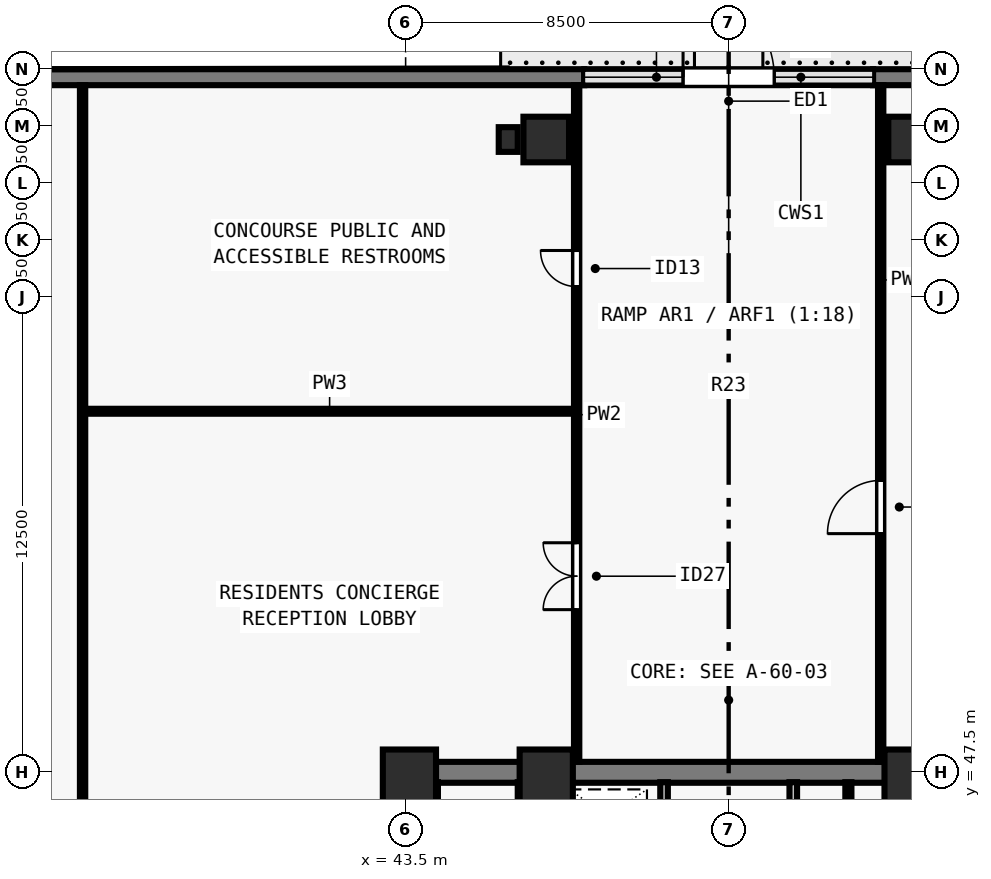
"""IFC4 building model, lengths in metres.
Left out: names, types, materials, properties, quantities, classifications, styles, units other than length and angle.
Written with IfcOpenShell. Run it as: python <this file> out.ifc"""

import sys

from ifc_helpers import new_model, si_unit, direction, frame, frame_2d, origin, origin_2d, place, context, subcontext, project, spatial, rectangle, extrude, element, fill, save


model = new_model("IFC4")
c1 = context("Model", 3, precision=1e-05, world=origin(), true_north=direction((0.0, 1.0)))
c2 = subcontext(c1, "Body", "Model", "MODEL_VIEW")
j1 = project(units=[si_unit("LENGTHUNIT", "METRE"), si_unit("PLANEANGLEUNIT", "RADIAN")], contexts=[c1])
p1 = place(None, origin())
s1 = spatial("IfcSite", under=j1, at=p1, CompositionType="ELEMENT")
p2 = place(p1, origin())
s2 = spatial("IfcBuilding", under=s1, at=p2, CompositionType="ELEMENT")
p3 = place(p2, origin())
s3 = spatial("IfcBuildingStorey", under=s2, at=p3, CompositionType="ELEMENT", Elevation=0.0)
for number, where, z_axis, x_axis in (
    (1, (43.6, 47.4, 0.0), (0.0, 0.0, 1.0), (1.0, 0.0, 0.0)),
    (2, (47.2, 47.4, 0.0), (0.0, 0.0, 1.0), (1.0, 0.0, 0.0)),
    (3, (56.8, 47.4, 0.0), (0.0, 0.0, 1.0), (1.0, 0.0, 0.0)),
):
    element("IfcColumn", number, at=place(p3, frame(where, z_axis=z_axis, x_axis=x_axis)), inside=s3, PredefinedType="COLUMN", context=c2, shape_type="SweptSolid", body=[
        extrude(rectangle(XDim=1.4, YDim=1.4, at=origin_2d()), origin(), (0.0, 0.0, 1.0), 5.0),
    ])
for number, where, z_axis, x_axis in (
    (4, (56.8, 64.15, 0.0), (0.0, 0.0, 1.0), (1.0, 0.0, 0.0)),
    (5, (47.2, 64.15, 0.0), (0.0, 0.0, 1.0), (1.0, 0.0, 0.0)),
):
    element("IfcColumn", number, at=place(p3, frame(where, z_axis=z_axis, x_axis=x_axis)), inside=s3, PredefinedType="COLUMN", context=c2, shape_type="SweptSolid", body=[
        extrude(rectangle(XDim=1.2, YDim=1.2, at=origin_2d()), origin(), (0.0, 0.0, 1.0), 5.0),
    ])
p4 = place(p3, frame((46.2, 64.15, 0.0), z_axis=(0.0, 0.0, 1.0), x_axis=(1.0, 0.0, 0.0)))
e6 = element("IfcColumn", 6, at=p4, inside=s3, PredefinedType="PILASTER", context=c2, shape_type="SweptSolid", body=[
    extrude(rectangle(XDim=0.5, YDim=0.65, at=origin_2d()), origin(), (0.0, 0.0, 1.0), 5.0),
])
p5 = place(p3, frame((18.0, 65.79, 0.0), z_axis=(0.0, 0.0, 1.0), x_axis=(1.0, 0.0, 0.0)))
e7 = element("IfcWall", 7, at=p5, inside=s3, PredefinedType="SOLIDWALL", context=c2, shape_type="SweptSolid", body=[
    extrude(rectangle(XDim=30.2, YDim=0.42, at=frame_2d((15.1, 0.0))), origin(), (0.0, 0.0, 1.0), 4.7),
])
p6 = place(p5, frame((14.5, 0.0, 0.0)))
e8 = element("IfcOpeningElement", 8, at=p6, cuts=e7, PredefinedType="OPENING", context=c2, shape_type="SweptSolid", body=[
    extrude(rectangle(XDim=1.25, YDim=2.15, at=frame_2d((0.625, 1.075))), frame((0.0, 0.22, 0.0), z_axis=(0.0, -1.0, 0.0), x_axis=(1.0, 0.0, 0.0)), (0.0, 0.0, 1.0), 0.44),
])
p7 = place(p3, frame((48.2, 65.79, 0.0), z_axis=(0.0, 0.0, 1.0), x_axis=(1.0, 0.0, 0.0)))
e9 = element("IfcWall", 9, at=p7, inside=s3, PredefinedType="SOLIDWALL", context=c2, shape_type="SweptSolid", body=[
    extrude(rectangle(XDim=7.6, YDim=0.42, at=frame_2d((3.8, 0.0))), origin(), (0.0, 0.0, 1.0), 2.85),
])
p8 = place(p7, frame((2.6, 0.0, 0.0)))
e10 = element("IfcOpeningElement", 10, at=p8, cuts=e9, PredefinedType="OPENING", context=c2, shape_type="SweptSolid", body=[
    extrude(rectangle(XDim=2.4, YDim=2.7, at=frame_2d((1.2, 1.35))), frame((0.0, 0.22, 0.0), z_axis=(0.0, -1.0, 0.0), x_axis=(1.0, 0.0, 0.0)), (0.0, 0.0, 1.0), 0.44),
])
p9 = place(p3, frame((55.8, 65.79, 0.0), z_axis=(0.0, 0.0, 1.0), x_axis=(1.0, 0.0, 0.0)))
e11 = element("IfcWall", 11, at=p9, inside=s3, PredefinedType="SOLIDWALL", context=c2, shape_type="SweptSolid", body=[
    extrude(rectangle(XDim=21.795, YDim=0.42, at=frame_2d((10.897, 0.0))), origin(), (0.0, 0.0, 1.0), 4.7),
])
p10 = place(p9, frame((9.5, 0.0, 0.0)))
e12 = element("IfcOpeningElement", 12, at=p10, cuts=e11, PredefinedType="OPENING", context=c2, shape_type="SweptSolid", body=[
    extrude(rectangle(XDim=1.8, YDim=2.35, at=frame_2d((0.9, 1.175))), frame((0.0, 0.22, 0.0), z_axis=(0.0, -1.0, 0.0), x_axis=(1.0, 0.0, 0.0)), (0.0, 0.0, 1.0), 0.44),
])
p11 = place(p3, frame((43.225, 47.5, 0.0), z_axis=(0.0, 0.0, 1.0), x_axis=(1.0, 0.0, 0.0)))
e13 = element("IfcWall", 13, at=p11, inside=s3, PredefinedType="SHEAR", context=c2, shape_type="SweptSolid", body=[
    extrude(rectangle(XDim=17.55, YDim=0.55, at=frame_2d((8.775, 0.0))), origin(), (0.0, 0.0, 1.0), 4.7),
])
p12 = place(p3, frame((43.5, 40.8, 0.0), z_axis=(0.0, 0.0, 1.0), x_axis=(0.0, 1.0, 0.0)))
e14 = element("IfcWall", 14, at=p12, inside=s3, PredefinedType="SHEAR", context=c2, shape_type="SweptSolid", body=[
    extrude(rectangle(XDim=6.435, YDim=0.55, at=frame_2d((3.218, 0.0))), origin(), (0.0, 0.0, 1.0), 4.7),
])
p13 = place(p3, frame((50.3, 40.585, 0.0), z_axis=(0.0, 0.0, 1.0), x_axis=(0.0, 1.0, 0.0)))
e15 = element("IfcWall", 15, at=p13, inside=s3, PredefinedType="SOLIDWALL", context=c2, shape_type="SweptSolid", body=[
    extrude(rectangle(XDim=6.655, YDim=0.2, at=frame_2d((3.328, 0.0))), origin(), (0.0, 0.0, 1.0), 4.7),
])
p14 = place(p13, frame((0.515, 0.0, 0.0)))
e16 = element("IfcOpeningElement", 16, at=p14, cuts=e15, PredefinedType="OPENING", context=c2, shape_type="SweptSolid", body=[
    extrude(rectangle(XDim=1.1, YDim=2.2, at=frame_2d((0.55, 1.1))), frame((0.0, 0.11, 0.0), z_axis=(0.0, -1.0, 0.0), x_axis=(1.0, 0.0, 0.0)), (0.0, 0.0, 1.0), 0.22),
])
p15 = place(p13, frame((3.015, 0.0, 0.0)))
e17 = element("IfcOpeningElement", 17, at=p15, cuts=e15, PredefinedType="OPENING", context=c2, shape_type="SweptSolid", body=[
    extrude(rectangle(XDim=1.1, YDim=2.2, at=frame_2d((0.55, 1.1))), frame((0.0, 0.11, 0.0), z_axis=(0.0, -1.0, 0.0), x_axis=(1.0, 0.0, 0.0)), (0.0, 0.0, 1.0), 0.22),
])
p16 = place(p13, frame((5.065, 0.0, 0.0)))
e18 = element("IfcOpeningElement", 18, at=p16, cuts=e15, PredefinedType="OPENING", context=c2, shape_type="SweptSolid", body=[
    extrude(rectangle(XDim=0.8, YDim=2.08, at=frame_2d((0.4, 1.04))), frame((0.0, 0.11, 0.0), z_axis=(0.0, -1.0, 0.0), x_axis=(1.0, 0.0, 0.0)), (0.0, 0.0, 1.0), 0.22),
])
p17 = place(p3, frame((53.7, 40.585, 0.0), z_axis=(0.0, 0.0, 1.0), x_axis=(0.0, 1.0, 0.0)))
e19 = element("IfcWall", 19, at=p17, inside=s3, PredefinedType="SOLIDWALL", context=c2, shape_type="SweptSolid", body=[
    extrude(rectangle(XDim=6.655, YDim=0.2, at=frame_2d((3.328, 0.0))), origin(), (0.0, 0.0, 1.0), 4.7),
])
p18 = place(p17, frame((0.195, 0.0, 0.0)))
e20 = element("IfcOpeningElement", 20, at=p18, cuts=e19, PredefinedType="OPENING", context=c2, shape_type="SweptSolid", body=[
    extrude(rectangle(XDim=0.8, YDim=2.08, at=frame_2d((0.4, 1.04))), frame((0.0, 0.11, 0.0), z_axis=(0.0, -1.0, 0.0), x_axis=(1.0, 0.0, 0.0)), (0.0, 0.0, 1.0), 0.22),
])
p19 = place(p17, frame((1.865, 0.0, 0.0)))
e21 = element("IfcOpeningElement", 21, at=p19, cuts=e19, PredefinedType="OPENING", context=c2, shape_type="SweptSolid", body=[
    extrude(rectangle(XDim=1.1, YDim=2.2, at=frame_2d((0.55, 1.1))), frame((0.0, 0.11, 0.0), z_axis=(0.0, -1.0, 0.0), x_axis=(1.0, 0.0, 0.0)), (0.0, 0.0, 1.0), 0.22),
])
p20 = place(p17, frame((4.265, 0.0, 0.0)))
e22 = element("IfcOpeningElement", 22, at=p20, cuts=e19, PredefinedType="OPENING", context=c2, shape_type="SweptSolid", body=[
    extrude(rectangle(XDim=0.95, YDim=2.12, at=frame_2d((0.475, 1.06))), frame((0.0, 0.11, 0.0), z_axis=(0.0, -1.0, 0.0), x_axis=(1.0, 0.0, 0.0)), (0.0, 0.0, 1.0), 0.22),
])
for number, where, z_axis, x_axis in (
    (23, (46.55, 43.735, 0.0), (0.0, 0.0, 1.0), (0.0, 1.0, 0.0)),
    (24, (44.25, 43.735, 0.0), (0.0, 0.0, 1.0), (0.0, 1.0, 0.0)),
):
    element("IfcWall", number, at=place(p3, frame(where, z_axis=z_axis, x_axis=x_axis)), inside=s3, PredefinedType="SOLIDWALL", context=c2, shape_type="SweptSolid", body=[
        extrude(rectangle(XDim=3.505, YDim=0.2, at=frame_2d((1.752, 0.0))), origin(), (0.0, 0.0, 1.0), 4.7),
    ])
for number, where, z_axis, x_axis in (
    (25, (47.35, 43.735, 0.0), (0.0, 0.0, 1.0), (0.0, 1.0, 0.0)),
    (26, (56.65, 43.735, 0.0), (0.0, 0.0, 1.0), (0.0, 1.0, 0.0)),
):
    element("IfcWall", number, at=place(p3, frame(where, z_axis=z_axis, x_axis=x_axis)), inside=s3, PredefinedType="SOLIDWALL", context=c2, shape_type="SweptSolid", body=[
        extrude(rectangle(XDim=3.505, YDim=0.18, at=frame_2d((1.752, 0.0))), origin(), (0.0, 0.0, 1.0), 4.7),
    ])
p21 = place(p3, frame((55.15, 44.195, 0.0), z_axis=(0.0, 0.0, 1.0), x_axis=(0.0, 1.0, 0.0)))
e27 = element("IfcWall", 27, at=p21, inside=s3, PredefinedType="PARTITIONING", context=c2, shape_type="SweptSolid", body=[
    extrude(rectangle(XDim=3.045, YDim=0.16, at=frame_2d((1.522, 0.0))), origin(), (0.0, 0.0, 1.0), 4.7),
])
p22 = place(p21, frame((1.025, 0.0, 0.0)))
e28 = element("IfcOpeningElement", 28, at=p22, cuts=e27, PredefinedType="OPENING", context=c2, shape_type="SweptSolid", body=[
    extrude(rectangle(XDim=0.8, YDim=2.1, at=frame_2d((0.4, 1.05))), frame((0.0, 0.09, 0.0), z_axis=(0.0, -1.0, 0.0), x_axis=(1.0, 0.0, 0.0)), (0.0, 0.0, 1.0), 0.18),
])
p23 = place(p3, frame((48.0, 47.78, 0.0), z_axis=(0.0, 0.0, 1.0), x_axis=(0.0, 1.0, 0.0)))
e29 = element("IfcWall", 29, at=p23, inside=s3, PredefinedType="PARTITIONING", context=c2, shape_type="SweptSolid", body=[
    extrude(rectangle(XDim=17.8, YDim=0.14, at=frame_2d((8.9, 0.0))), origin(), (0.0, 0.0, 1.0), 4.7),
])
p24 = place(p23, frame((4.0, 0.0, 0.0)))
e30 = element("IfcOpeningElement", 30, at=p24, cuts=e29, PredefinedType="OPENING", context=c2, shape_type="SweptSolid", body=[
    extrude(rectangle(XDim=1.76, YDim=2.2, at=frame_2d((0.88, 1.1))), frame((0.0, 0.08, 0.0), z_axis=(0.0, -1.0, 0.0), x_axis=(1.0, 0.0, 0.0)), (0.0, 0.0, 1.0), 0.16),
])
p25 = place(p23, frame((12.5, 0.0, 0.0)))
e31 = element("IfcOpeningElement", 31, at=p25, cuts=e29, PredefinedType="OPENING", context=c2, shape_type="SweptSolid", body=[
    extrude(rectangle(XDim=0.95, YDim=2.1, at=frame_2d((0.475, 1.05))), frame((0.0, 0.08, 0.0), z_axis=(0.0, -1.0, 0.0), x_axis=(1.0, 0.0, 0.0)), (0.0, 0.0, 1.0), 0.16),
])
p26 = place(p3, frame((56.0, 47.78, 0.0), z_axis=(0.0, 0.0, 1.0), x_axis=(0.0, 1.0, 0.0)))
e32 = element("IfcWall", 32, at=p26, inside=s3, PredefinedType="PARTITIONING", context=c2, shape_type="SweptSolid", body=[
    extrude(rectangle(XDim=17.8, YDim=0.14, at=frame_2d((8.9, 0.0))), origin(), (0.0, 0.0, 1.0), 4.7),
])
p27 = place(p26, frame((6.0, 0.0, 0.0)))
e33 = element("IfcOpeningElement", 33, at=p27, cuts=e32, PredefinedType="OPENING", context=c2, shape_type="SweptSolid", body=[
    extrude(rectangle(XDim=1.4, YDim=2.2, at=frame_2d((0.7, 1.1))), frame((0.0, 0.08, 0.0), z_axis=(0.0, -1.0, 0.0), x_axis=(1.0, 0.0, 0.0)), (0.0, 0.0, 1.0), 0.16),
])
p28 = place(p3, frame((35.0, 41.455, 0.0), z_axis=(0.0, 0.0, 1.0), x_axis=(0.0, 1.0, 0.0)))
e34 = element("IfcWall", 34, at=p28, inside=s3, PredefinedType="PARTITIONING", context=c2, shape_type="SweptSolid", body=[
    extrude(rectangle(XDim=24.125, YDim=0.14, at=frame_2d((12.062, 0.0))), origin(), (0.0, 0.0, 1.0), 3.751),
])
p29 = place(p3, frame((35.055, 57.0, 0.0), z_axis=(0.0, 0.0, 1.0), x_axis=(1.0, 0.0, 0.0)))
e35 = element("IfcWall", 35, at=p29, inside=s3, PredefinedType="PLUMBINGWALL", context=c2, shape_type="SweptSolid", body=[
    extrude(rectangle(XDim=12.89, YDim=0.13, at=frame_2d((6.445, 0.0))), origin(), (0.0, 0.0, 1.0), 4.7),
])
p30 = place(p8, origin())
e36 = element("IfcDoor", 36, at=p30, inside=s3, OperationType="SINGLE_SWING_LEFT", PredefinedType="DOOR", context=c2, shape_type="SweptSolid", body=[
    extrude(rectangle(XDim=2.4, YDim=2.7, at=frame_2d((1.2, 1.35))), frame((0.0, 0.025, 0.0), z_axis=(0.0, -1.0, 0.0), x_axis=(1.0, 0.0, 0.0)), (0.0, 0.0, 1.0), 0.05),
])
fill(e10, e36)
p31 = place(p24, origin())
e37 = element("IfcDoor", 37, at=p31, inside=s3, OperationType="DOUBLE_DOOR_SINGLE_SWING", PredefinedType="DOOR", context=c2, shape_type="SweptSolid", body=[
    extrude(rectangle(XDim=1.76, YDim=2.2, at=frame_2d((0.88, 1.1))), frame((0.0, 0.025, 0.0), z_axis=(0.0, -1.0, 0.0), x_axis=(1.0, 0.0, 0.0)), (0.0, 0.0, 1.0), 0.05),
])
fill(e30, e37)
p32 = place(p25, origin())
e38 = element("IfcDoor", 38, at=p32, inside=s3, OperationType="SINGLE_SWING_RIGHT", PredefinedType="DOOR", context=c2, shape_type="SweptSolid", body=[
    extrude(rectangle(XDim=0.95, YDim=2.1, at=frame_2d((0.475, 1.05))), frame((0.0, 0.025, 0.0), z_axis=(0.0, -1.0, 0.0), x_axis=(1.0, 0.0, 0.0)), (0.0, 0.0, 1.0), 0.05),
])
fill(e31, e38)
p33 = place(p27, origin())
e39 = element("IfcDoor", 39, at=p33, inside=s3, OperationType="SINGLE_SWING_LEFT", PredefinedType="DOOR", context=c2, shape_type="SweptSolid", body=[
    extrude(rectangle(XDim=1.4, YDim=2.2, at=frame_2d((0.7, 1.1))), frame((0.0, 0.025, 0.0), z_axis=(0.0, -1.0, 0.0), x_axis=(1.0, 0.0, 0.0)), (0.0, 0.0, 1.0), 0.05),
])
fill(e33, e39)
save(model, sys.argv[1])
